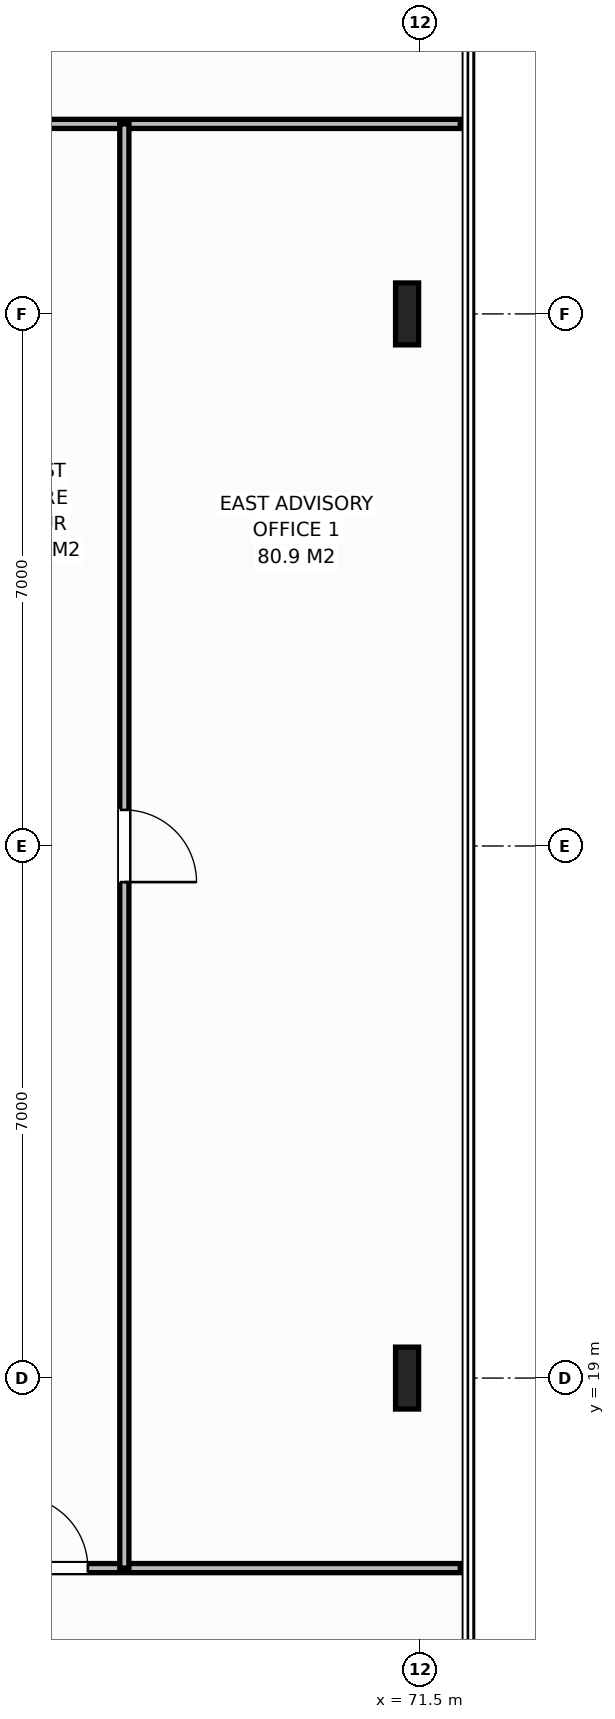
"""IFC4 building model, lengths in metres.
Left out: names, types, materials, properties, quantities, classifications, styles, units other than length and angle.
Written with IfcOpenShell. Run it as: python <this file> out.ifc"""

import sys

from ifc_helpers import new_model, si_unit, direction, frame, frame_2d, origin, origin_2d, place, context, subcontext, project, spatial, rectangle, i_section, extrude, element, fill, save


model = new_model("IFC4")
c1 = context("Model", 3, precision=1e-05, world=origin(), true_north=direction((0.0, 1.0)))
c2 = subcontext(c1, "Body", "Model", "MODEL_VIEW")
j1 = project(units=[si_unit("LENGTHUNIT", "METRE"), si_unit("PLANEANGLEUNIT", "RADIAN")], contexts=[c1])
p1 = place(None, origin())
s1 = spatial("IfcSite", under=j1, at=p1, CompositionType="ELEMENT")
p2 = place(p1, origin())
s2 = spatial("IfcBuilding", under=s1, at=p2, CompositionType="ELEMENT")
p3 = place(p2, frame((0.0, 0.0, 221.4)))
s3 = spatial("IfcBuildingStorey", under=s2, at=p3, CompositionType="ELEMENT", Elevation=221.4)
for number, where, z_axis, x_axis in (
    (1, (71.32, 19.0, 0.0), (0.0, 0.0, 1.0), (1.0, 0.0, 0.0)),
    (2, (71.32, 33.0, 0.0), (0.0, 0.0, 1.0), (1.0, 0.0, 0.0)),
):
    element("IfcColumn", number, at=place(p3, frame(where, z_axis=z_axis, x_axis=x_axis)), inside=s3, PredefinedType="COLUMN", context=c2, shape_type="SweptSolid", body=[
        extrude(i_section(OverallWidth=0.303, OverallDepth=0.814, WebThickness=0.021, FlangeThickness=0.04, at=origin_2d()), origin(), (0.0, 0.0, 1.0), 3.8),
    ])
p4 = place(p3, frame((59.691, 35.5, 0.0), z_axis=(0.0, 0.0, 1.0), x_axis=(1.0, 0.0, 0.0)))
e3 = element("IfcWall", 3, at=p4, inside=s3, PredefinedType="PARTITIONING", context=c2, shape_type="SweptSolid", body=[
    extrude(rectangle(XDim=12.329, YDim=0.12, at=frame_2d((6.165, 0.0))), origin(), (0.0, 0.0, 1.0), 3.58),
])
p5 = place(p4, frame((0.48, 0.0, 0.0)))
e4 = element("IfcOpeningElement", 4, at=p5, cuts=e3, PredefinedType="OPENING", context=c2, shape_type="SweptSolid", body=[
    extrude(rectangle(XDim=0.95, YDim=2.15, at=frame_2d((0.475, 1.075))), frame((0.0, 0.07, 0.0), z_axis=(0.0, -1.0, 0.0), x_axis=(1.0, 0.0, 0.0)), (0.0, 0.0, 1.0), 0.14),
])
p6 = place(p3, frame((64.86, 16.5, 0.0), z_axis=(0.0, 0.0, 1.0), x_axis=(1.0, 0.0, 0.0)))
e5 = element("IfcWall", 5, at=p6, inside=s3, PredefinedType="PARTITIONING", context=c2, shape_type="SweptSolid", body=[
    extrude(rectangle(XDim=7.16, YDim=0.12, at=frame_2d((3.58, 0.0))), origin(), (0.0, 0.0, 1.0), 3.58),
])
p7 = place(p6, frame((1.31, 0.0, 0.0)))
e6 = element("IfcOpeningElement", 6, at=p7, cuts=e5, PredefinedType="OPENING", context=c2, shape_type="SweptSolid", body=[
    extrude(rectangle(XDim=0.95, YDim=2.15, at=frame_2d((0.475, 1.075))), frame((0.0, 0.07, 0.0), z_axis=(0.0, -1.0, 0.0), x_axis=(1.0, 0.0, 0.0)), (0.0, 0.0, 1.0), 0.14),
])
p8 = place(p3, frame((67.6, 16.5, 0.0), z_axis=(0.0, 0.0, 1.0), x_axis=(0.0, 1.0, 0.0)))
e7 = element("IfcWall", 7, at=p8, inside=s3, PredefinedType="PARTITIONING", context=c2, shape_type="SweptSolid", body=[
    extrude(rectangle(XDim=19.0, YDim=0.12, at=frame_2d((9.5, 0.0))), origin(), (0.0, 0.0, 1.0), 3.58),
])
p9 = place(p8, frame((9.025, 0.0, 0.0)))
e8 = element("IfcOpeningElement", 8, at=p9, cuts=e7, PredefinedType="OPENING", context=c2, shape_type="SweptSolid", body=[
    extrude(rectangle(XDim=0.95, YDim=2.15, at=frame_2d((0.475, 1.075))), frame((0.0, 0.07, 0.0), z_axis=(0.0, -1.0, 0.0), x_axis=(1.0, 0.0, 0.0)), (0.0, 0.0, 1.0), 0.14),
])
p10 = place(p7, origin())
e9 = element("IfcDoor", 9, at=p10, inside=s3, OperationType="SINGLE_SWING_LEFT", PredefinedType="DOOR", context=c2, shape_type="SweptSolid", body=[
    extrude(rectangle(XDim=0.95, YDim=2.15, at=frame_2d((0.475, 1.075))), frame((0.0, 0.025, 0.0), z_axis=(0.0, -1.0, 0.0), x_axis=(1.0, 0.0, 0.0)), (0.0, 0.0, 1.0), 0.05),
])
fill(e6, e9)
p11 = place(p9, origin())
e10 = element("IfcDoor", 10, at=p11, inside=s3, OperationType="SINGLE_SWING_RIGHT", PredefinedType="DOOR", context=c2, shape_type="SweptSolid", body=[
    extrude(rectangle(XDim=0.95, YDim=2.15, at=frame_2d((0.475, 1.075))), frame((0.0, 0.025, 0.0), z_axis=(0.0, -1.0, 0.0), x_axis=(1.0, 0.0, 0.0)), (0.0, 0.0, 1.0), 0.05),
])
fill(e8, e10)
save(model, sys.argv[1])
